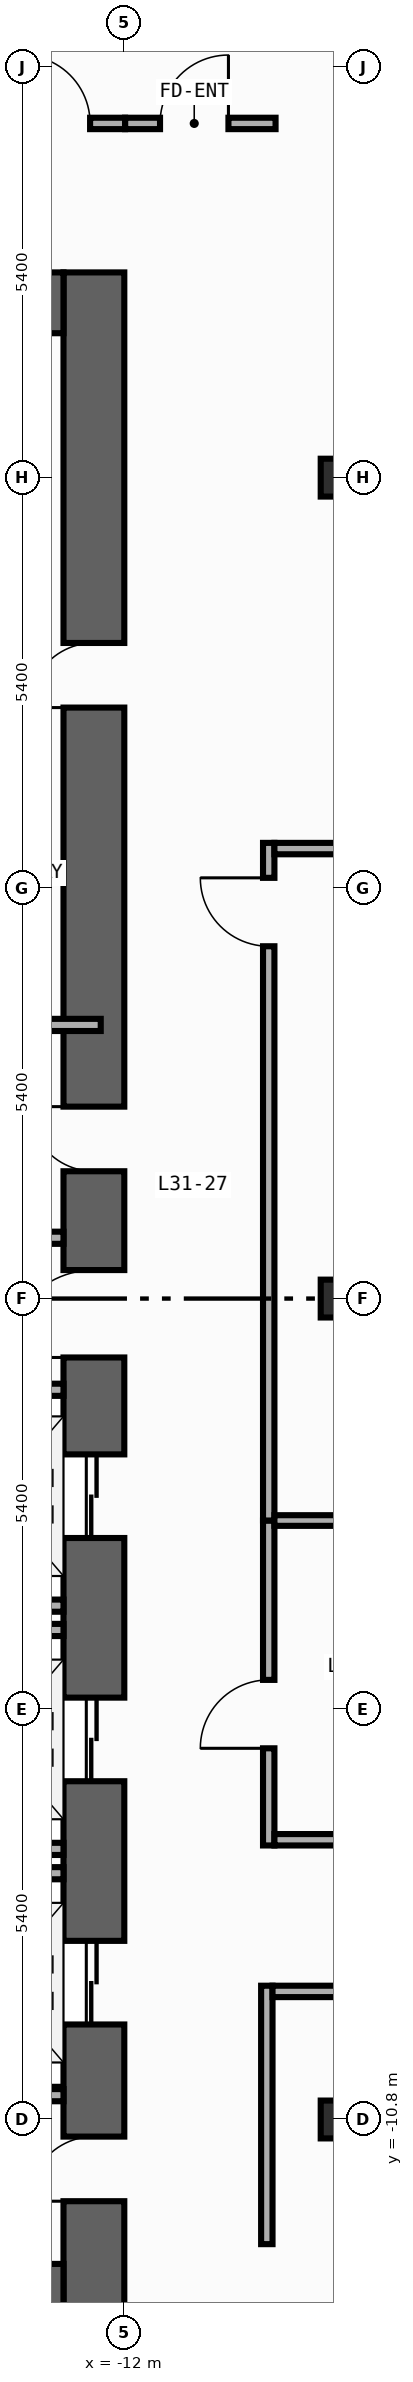
"""IFC4 building model, lengths in metres.
Left out: names, types, materials, properties, quantities, classifications, styles, units other than length and angle.
Written with IfcOpenShell. Run it as: python <this file> out.ifc"""

import sys

from ifc_helpers import new_model, si_unit, direction, frame, frame_2d, origin, origin_2d, place, context, subcontext, project, spatial, rectangle, i_section, extrude, element, fill, save


model = new_model("IFC4")
c1 = context("Model", 3, precision=1e-05, world=origin(), true_north=direction((0.0, 1.0)))
c2 = subcontext(c1, "Body", "Model", "MODEL_VIEW")
j1 = project(units=[si_unit("LENGTHUNIT", "METRE"), si_unit("PLANEANGLEUNIT", "RADIAN")], contexts=[c1])
p1 = place(None, origin())
s1 = spatial("IfcSite", under=j1, at=p1, CompositionType="ELEMENT")
p2 = place(p1, origin())
s2 = spatial("IfcBuilding", under=s1, at=p2, CompositionType="ELEMENT")
p3 = place(p2, frame((0.0, 0.0, 135.2)))
s3 = spatial("IfcBuildingStorey", under=s2, at=p3, CompositionType="ELEMENT", Elevation=135.2)
p4 = place(p3, frame((-12.4, -13.5, 0.0), z_axis=(0.0, 0.0, 1.0), x_axis=(0.0, 1.0, 0.0)))
e1 = element("IfcWall", 1, at=p4, inside=s3, PredefinedType="SHEAR", context=c2, shape_type="SweptSolid", body=[
    extrude(rectangle(XDim=27.0, YDim=0.8, at=frame_2d((13.5, 0.0))), origin(), (0.0, 0.0, 1.0), 3.94),
])
p5 = place(p4, frame((10.35, 0.0, 0.0)))
e2 = element("IfcOpeningElement", 2, at=p5, cuts=e1, PredefinedType="OPENING", context=c2, shape_type="SweptSolid", body=[
    extrude(rectangle(XDim=1.1, YDim=2.2, at=frame_2d((0.55, 1.1))), frame((0.0, 0.41, 0.0), z_axis=(0.0, -1.0, 0.0), x_axis=(1.0, 0.0, 0.0)), (0.0, 0.0, 1.0), 0.82),
])
p6 = place(p4, frame((7.15, 0.0, 0.0)))
e3 = element("IfcOpeningElement", 3, at=p6, cuts=e1, PredefinedType="OPENING", context=c2, shape_type="SweptSolid", body=[
    extrude(rectangle(XDim=1.1, YDim=2.2, at=frame_2d((0.55, 1.1))), frame((0.0, 0.41, 0.0), z_axis=(0.0, -1.0, 0.0), x_axis=(1.0, 0.0, 0.0)), (0.0, 0.0, 1.0), 0.82),
])
p7 = place(p4, frame((3.95, 0.0, 0.0)))
e4 = element("IfcOpeningElement", 4, at=p7, cuts=e1, PredefinedType="OPENING", context=c2, shape_type="SweptSolid", body=[
    extrude(rectangle(XDim=1.1, YDim=2.2, at=frame_2d((0.55, 1.1))), frame((0.0, 0.41, 0.0), z_axis=(0.0, -1.0, 0.0), x_axis=(1.0, 0.0, 0.0)), (0.0, 0.0, 1.0), 0.82),
])
p8 = place(p4, frame((15.175, 0.0, 0.0)))
e5 = element("IfcOpeningElement", 5, at=p8, cuts=e1, PredefinedType="OPENING", context=c2, shape_type="SweptSolid", body=[
    extrude(rectangle(XDim=0.85, YDim=2.1, at=frame_2d((0.425, 1.05))), frame((0.0, 0.41, 0.0), z_axis=(0.0, -1.0, 0.0), x_axis=(1.0, 0.0, 0.0)), (0.0, 0.0, 1.0), 0.82),
])
p9 = place(p4, frame((21.275, 0.0, 0.0)))
e6 = element("IfcOpeningElement", 6, at=p9, cuts=e1, PredefinedType="OPENING", context=c2, shape_type="SweptSolid", body=[
    extrude(rectangle(XDim=0.85, YDim=2.1, at=frame_2d((0.425, 1.05))), frame((0.0, 0.41, 0.0), z_axis=(0.0, -1.0, 0.0), x_axis=(1.0, 0.0, 0.0)), (0.0, 0.0, 1.0), 0.82),
])
p10 = place(p4, frame((12.725, 0.0, 0.0)))
e7 = element("IfcOpeningElement", 7, at=p10, cuts=e1, PredefinedType="OPENING", context=c2, shape_type="SweptSolid", body=[
    extrude(rectangle(XDim=1.15, YDim=2.2, at=frame_2d((0.575, 1.1))), frame((0.0, 0.41, 0.0), z_axis=(0.0, -1.0, 0.0), x_axis=(1.0, 0.0, 0.0)), (0.0, 0.0, 1.0), 0.82),
])
p11 = place(p4, frame((1.625, 0.0, 0.0)))
e8 = element("IfcOpeningElement", 8, at=p11, cuts=e1, PredefinedType="OPENING", context=c2, shape_type="SweptSolid", body=[
    extrude(rectangle(XDim=0.85, YDim=2.1, at=frame_2d((0.425, 1.05))), frame((0.0, 0.41, 0.0), z_axis=(0.0, -1.0, 0.0), x_axis=(1.0, 0.0, 0.0)), (0.0, 0.0, 1.0), 0.82),
])
for number, where, z_axis, x_axis in (
    (9, (-19.6, -13.1, 0.0), (0.0, 0.0, 1.0), (1.0, 0.0, 0.0)),
    (10, (-19.6, 13.1, 0.0), (0.0, 0.0, 1.0), (1.0, 0.0, 0.0)),
):
    element("IfcWall", number, at=place(p3, frame(where, z_axis=z_axis, x_axis=x_axis)), inside=s3, PredefinedType="SHEAR", context=c2, shape_type="SweptSolid", body=[
        extrude(rectangle(XDim=6.8, YDim=0.8, at=frame_2d((3.4, 0.0))), origin(), (0.0, 0.0, 1.0), 3.94),
    ])
for number, where, z_axis, x_axis in (
    (11, (-9.2, -10.8, 0.0), (0.0, 0.0, 1.0), (1.0, 0.0, 0.0)),
    (12, (-9.2, 0.0, 0.0), (0.0, 0.0, 1.0), (1.0, 0.0, 0.0)),
    (13, (-9.2, 10.8, 0.0), (0.0, 0.0, 1.0), (1.0, 0.0, 0.0)),
):
    element("IfcColumn", number, at=place(p3, frame(where, z_axis=z_axis, x_axis=x_axis)), inside=s3, PredefinedType="COLUMN", context=c2, shape_type="SweptSolid", body=[
        extrude(i_section(OverallWidth=0.432, OverallDepth=0.498, WebThickness=0.045, FlangeThickness=0.07, FilletRadius=0.022, at=origin_2d()), origin(), (0.0, 0.0, 1.0), 4.2),
    ])
for number, where, z_axis, x_axis in (
    (14, (-14.99, -4.04, 0.0), (0.0, 0.0, 1.0), (1.0, 0.0, 0.0)),
    (15, (-14.99, -7.24, 0.0), (0.0, 0.0, 1.0), (1.0, 0.0, 0.0)),
    (16, (-14.99, -4.36, 0.0), (0.0, 0.0, 1.0), (1.0, 0.0, 0.0)),
    (17, (-14.99, -7.56, 0.0), (0.0, 0.0, 1.0), (1.0, 0.0, 0.0)),
):
    element("IfcWall", number, at=place(p3, frame(where, z_axis=z_axis, x_axis=x_axis)), inside=s3, PredefinedType="STANDARD", context=c2, shape_type="SweptSolid", body=[
        extrude(rectangle(XDim=2.19, YDim=0.16, at=frame_2d((1.095, 0.0))), origin(), (0.0, 0.0, 1.0), 3.94),
    ])
for number, where, z_axis, x_axis in (
    (18, (-15.4, 0.8, 0.0), (0.0, 0.0, 1.0), (1.0, 0.0, 0.0)),
    (19, (-15.4, -1.2, 0.0), (0.0, 0.0, 1.0), (1.0, 0.0, 0.0)),
    (20, (-15.4, -10.48, 0.0), (0.0, 0.0, 1.0), (1.0, 0.0, 0.0)),
):
    element("IfcWall", number, at=place(p3, frame(where, z_axis=z_axis, x_axis=x_axis)), inside=s3, PredefinedType="STANDARD", context=c2, shape_type="SweptSolid", body=[
        extrude(rectangle(XDim=2.6, YDim=0.16, at=frame_2d((1.3, 0.0))), origin(), (0.0, 0.0, 1.0), 3.94),
    ])
p12 = place(p3, frame((-15.375, 3.6, 0.0), z_axis=(0.0, 0.0, 1.0), x_axis=(1.0, 0.0, 0.0)))
e21 = element("IfcWall", 21, at=p12, inside=s3, PredefinedType="PARTITIONING", context=c2, shape_type="SweptSolid", body=[
    extrude(rectangle(XDim=3.065, YDim=0.16, at=frame_2d((1.532, 0.0))), origin(), (0.0, 0.0, 1.0), 3.94),
])
p13 = place(p3, frame((-11.99, 15.46, 0.0), z_axis=(0.0, 0.0, 1.0), x_axis=(1.0, 0.0, 0.0)))
e22 = element("IfcWall", 22, at=p13, inside=s3, PredefinedType="PARTITIONING", context=c2, shape_type="SweptSolid", body=[
    extrude(rectangle(XDim=1.98, YDim=0.15, at=frame_2d((0.99, 0.0))), origin(), (0.0, 0.0, 1.0), 3.94),
])
p14 = place(p13, frame((0.46, 0.0, 0.0)))
e23 = element("IfcOpeningElement", 23, at=p14, cuts=e22, PredefinedType="OPENING", context=c2, shape_type="SweptSolid", body=[
    extrude(rectangle(XDim=0.9, YDim=2.15, at=frame_2d((0.45, 1.075))), frame((0.0, 0.085, 0.0), z_axis=(0.0, -1.0, 0.0), x_axis=(1.0, 0.0, 0.0)), (0.0, 0.0, 1.0), 0.17),
])
p15 = place(p3, frame((-10.1, -7.195, 0.0), z_axis=(0.0, 0.0, 1.0), x_axis=(0.0, 1.0, 0.0)))
e24 = element("IfcWall", 24, at=p15, inside=s3, PredefinedType="PARTITIONING", context=c2, shape_type="SweptSolid", body=[
    extrude(rectangle(XDim=4.275, YDim=0.15, at=frame_2d((2.138, 0.0))), origin(), (0.0, 0.0, 1.0), 3.94),
])
p16 = place(p15, frame((1.278, 0.0, 0.0)))
e25 = element("IfcOpeningElement", 25, at=p16, cuts=e24, PredefinedType="OPENING", context=c2, shape_type="SweptSolid", body=[
    extrude(rectangle(XDim=0.9, YDim=2.15, at=frame_2d((0.45, 1.075))), frame((0.0, 0.085, 0.0), z_axis=(0.0, -1.0, 0.0), x_axis=(1.0, 0.0, 0.0)), (0.0, 0.0, 1.0), 0.17),
])
p17 = place(p3, frame((-10.1, -2.92, 0.0), z_axis=(0.0, 0.0, 1.0), x_axis=(0.0, 1.0, 0.0)))
e26 = element("IfcWall", 26, at=p17, inside=s3, PredefinedType="PARTITIONING", context=c2, shape_type="SweptSolid", body=[
    extrude(rectangle(XDim=8.915, YDim=0.15, at=frame_2d((4.458, 0.0))), origin(), (0.0, 0.0, 1.0), 3.94),
])
p18 = place(p17, frame((7.555, 0.0, 0.0)))
e27 = element("IfcOpeningElement", 27, at=p18, cuts=e26, PredefinedType="OPENING", context=c2, shape_type="SweptSolid", body=[
    extrude(rectangle(XDim=0.9, YDim=2.15, at=frame_2d((0.45, 1.075))), frame((0.0, 0.085, 0.0), z_axis=(0.0, -1.0, 0.0), x_axis=(1.0, 0.0, 0.0)), (0.0, 0.0, 1.0), 0.17),
])
p19 = place(p3, frame((-10.125, -12.44, 0.0), z_axis=(0.0, 0.0, 1.0), x_axis=(0.0, 1.0, 0.0)))
e28 = element("IfcWall", 28, at=p19, inside=s3, PredefinedType="PARTITIONING", context=c2, shape_type="SweptSolid", body=[
    extrude(rectangle(XDim=3.4, YDim=0.15, at=frame_2d((1.7, 0.0))), origin(), (0.0, 0.0, 1.0), 3.94),
])
p20 = place(p3, frame((-10.025, 5.92, 0.0), z_axis=(0.0, 0.0, 1.0), x_axis=(1.0, 0.0, 0.0)))
e29 = element("IfcWall", 29, at=p20, inside=s3, PredefinedType="PARTITIONING", context=c2, shape_type="SweptSolid", body=[
    extrude(rectangle(XDim=8.82, YDim=0.15, at=frame_2d((4.41, 0.0))), origin(), (0.0, 0.0, 1.0), 3.94),
])
p21 = place(p20, frame((7.46, 0.0, 0.0)))
e30 = element("IfcOpeningElement", 30, at=p21, cuts=e29, PredefinedType="OPENING", context=c2, shape_type="SweptSolid", body=[
    extrude(rectangle(XDim=0.9, YDim=2.15, at=frame_2d((0.45, 1.075))), frame((0.0, 0.085, 0.0), z_axis=(0.0, -1.0, 0.0), x_axis=(1.0, 0.0, 0.0)), (0.0, 0.0, 1.0), 0.17),
])
p22 = place(p3, frame((-10.025, -7.12, 0.0), z_axis=(0.0, 0.0, 1.0), x_axis=(1.0, 0.0, 0.0)))
e31 = element("IfcWall", 31, at=p22, inside=s3, PredefinedType="PARTITIONING", context=c2, shape_type="SweptSolid", body=[
    extrude(rectangle(XDim=4.465, YDim=0.15, at=frame_2d((2.232, 0.0))), origin(), (0.0, 0.0, 1.0), 3.94),
])
p23 = place(p22, frame((3.105, 0.0, 0.0)))
e32 = element("IfcOpeningElement", 32, at=p23, cuts=e31, PredefinedType="OPENING", context=c2, shape_type="SweptSolid", body=[
    extrude(rectangle(XDim=0.9, YDim=2.15, at=frame_2d((0.45, 1.075))), frame((0.0, 0.085, 0.0), z_axis=(0.0, -1.0, 0.0), x_axis=(1.0, 0.0, 0.0)), (0.0, 0.0, 1.0), 0.17),
])
p24 = place(p3, frame((-10.05, -9.115, 0.0), z_axis=(0.0, 0.0, 1.0), x_axis=(1.0, 0.0, 0.0)))
e33 = element("IfcWall", 33, at=p24, inside=s3, PredefinedType="PARTITIONING", context=c2, shape_type="SweptSolid", body=[
    extrude(rectangle(XDim=8.265, YDim=0.15, at=frame_2d((4.133, 0.0))), origin(), (0.0, 0.0, 1.0), 3.94),
])
p25 = place(p24, frame((6.905, 0.0, 0.0)))
e34 = element("IfcOpeningElement", 34, at=p25, cuts=e33, PredefinedType="OPENING", context=c2, shape_type="SweptSolid", body=[
    extrude(rectangle(XDim=0.9, YDim=2.15, at=frame_2d((0.45, 1.075))), frame((0.0, 0.085, 0.0), z_axis=(0.0, -1.0, 0.0), x_axis=(1.0, 0.0, 0.0)), (0.0, 0.0, 1.0), 0.17),
])
p26 = place(p3, frame((-15.232, 15.46, 0.0), z_axis=(0.0, 0.0, 1.0), x_axis=(1.0, 0.0, 0.0)))
e35 = element("IfcWall", 35, at=p26, inside=s3, PredefinedType="PARTITIONING", context=c2, shape_type="SweptSolid", body=[
    extrude(rectangle(XDim=3.242, YDim=0.15, at=frame_2d((1.621, 0.0))), origin(), (0.0, 0.0, 1.0), 3.94),
])
p27 = place(p26, frame((1.882, 0.0, 0.0)))
e36 = element("IfcOpeningElement", 36, at=p27, cuts=e35, PredefinedType="OPENING", context=c2, shape_type="SweptSolid", body=[
    extrude(rectangle(XDim=0.9, YDim=2.15, at=frame_2d((0.45, 1.075))), frame((0.0, 0.085, 0.0), z_axis=(0.0, -1.0, 0.0), x_axis=(1.0, 0.0, 0.0)), (0.0, 0.0, 1.0), 0.17),
])
p28 = place(p3, frame((-10.025, -2.92, 0.0), z_axis=(0.0, 0.0, 1.0), x_axis=(1.0, 0.0, 0.0)))
e37 = element("IfcWall", 37, at=p28, inside=s3, PredefinedType="PARTITIONING", context=c2, shape_type="SweptSolid", body=[
    extrude(rectangle(XDim=4.465, YDim=0.14, at=frame_2d((2.232, 0.0))), origin(), (0.0, 0.0, 1.0), 3.94),
])
p29 = place(p5, origin())
e38 = element("IfcDoor", 38, at=p29, inside=s3, OperationType="DOUBLE_DOOR_SLIDING", PredefinedType="DOOR", context=c2, shape_type="SweptSolid", body=[
    extrude(rectangle(XDim=1.1, YDim=2.2, at=frame_2d((0.55, 1.1))), frame((0.0, 0.025, 0.0), z_axis=(0.0, -1.0, 0.0), x_axis=(1.0, 0.0, 0.0)), (0.0, 0.0, 1.0), 0.05),
])
fill(e2, e38)
p30 = place(p6, origin())
e39 = element("IfcDoor", 39, at=p30, inside=s3, OperationType="DOUBLE_DOOR_SLIDING", PredefinedType="DOOR", context=c2, shape_type="SweptSolid", body=[
    extrude(rectangle(XDim=1.1, YDim=2.2, at=frame_2d((0.55, 1.1))), frame((0.0, 0.025, 0.0), z_axis=(0.0, -1.0, 0.0), x_axis=(1.0, 0.0, 0.0)), (0.0, 0.0, 1.0), 0.05),
])
fill(e3, e39)
p31 = place(p7, origin())
e40 = element("IfcDoor", 40, at=p31, inside=s3, OperationType="DOUBLE_DOOR_SLIDING", PredefinedType="DOOR", context=c2, shape_type="SweptSolid", body=[
    extrude(rectangle(XDim=1.1, YDim=2.2, at=frame_2d((0.55, 1.1))), frame((0.0, 0.025, 0.0), z_axis=(0.0, -1.0, 0.0), x_axis=(1.0, 0.0, 0.0)), (0.0, 0.0, 1.0), 0.05),
])
fill(e4, e40)
p32 = place(p8, origin())
e41 = element("IfcDoor", 41, at=p32, inside=s3, OperationType="SINGLE_SWING_RIGHT", PredefinedType="DOOR", context=c2, shape_type="SweptSolid", body=[
    extrude(rectangle(XDim=0.85, YDim=2.1, at=frame_2d((0.425, 1.05))), frame((0.0, 0.025, 0.0), z_axis=(0.0, -1.0, 0.0), x_axis=(1.0, 0.0, 0.0)), (0.0, 0.0, 1.0), 0.05),
])
fill(e5, e41)
p33 = place(p9, origin())
e42 = element("IfcDoor", 42, at=p33, inside=s3, OperationType="SINGLE_SWING_LEFT", PredefinedType="DOOR", context=c2, shape_type="SweptSolid", body=[
    extrude(rectangle(XDim=0.85, YDim=2.1, at=frame_2d((0.425, 1.05))), frame((0.0, 0.025, 0.0), z_axis=(0.0, -1.0, 0.0), x_axis=(1.0, 0.0, 0.0)), (0.0, 0.0, 1.0), 0.05),
])
fill(e6, e42)
p34 = place(p10, origin())
e43 = element("IfcDoor", 43, at=p34, inside=s3, OperationType="SINGLE_SWING_LEFT", PredefinedType="DOOR", context=c2, shape_type="SweptSolid", body=[
    extrude(rectangle(XDim=1.15, YDim=2.2, at=frame_2d((0.575, 1.1))), frame((0.0, 0.025, 0.0), z_axis=(0.0, -1.0, 0.0), x_axis=(1.0, 0.0, 0.0)), (0.0, 0.0, 1.0), 0.05),
])
fill(e7, e43)
p35 = place(p11, origin())
e44 = element("IfcDoor", 44, at=p35, inside=s3, OperationType="SINGLE_SWING_LEFT", PredefinedType="DOOR", context=c2, shape_type="SweptSolid", body=[
    extrude(rectangle(XDim=0.85, YDim=2.1, at=frame_2d((0.425, 1.05))), frame((0.0, 0.025, 0.0), z_axis=(0.0, -1.0, 0.0), x_axis=(1.0, 0.0, 0.0)), (0.0, 0.0, 1.0), 0.05),
])
fill(e8, e44)
p36 = place(p14, origin())
e45 = element("IfcDoor", 45, at=p36, inside=s3, OperationType="SINGLE_SWING_RIGHT", PredefinedType="DOOR", context=c2, shape_type="SweptSolid", body=[
    extrude(rectangle(XDim=0.9, YDim=2.15, at=frame_2d((0.45, 1.075))), frame((0.0, 0.025, 0.0), z_axis=(0.0, -1.0, 0.0), x_axis=(1.0, 0.0, 0.0)), (0.0, 0.0, 1.0), 0.05),
])
fill(e23, e45)
p37 = place(p16, origin())
e46 = element("IfcDoor", 46, at=p37, inside=s3, OperationType="SINGLE_SWING_LEFT", PredefinedType="DOOR", context=c2, shape_type="SweptSolid", body=[
    extrude(rectangle(XDim=0.9, YDim=2.15, at=frame_2d((0.45, 1.075))), frame((0.0, 0.025, 0.0), z_axis=(0.0, -1.0, 0.0), x_axis=(1.0, 0.0, 0.0)), (0.0, 0.0, 1.0), 0.05),
])
fill(e25, e46)
p38 = place(p18, origin())
e47 = element("IfcDoor", 47, at=p38, inside=s3, OperationType="SINGLE_SWING_RIGHT", PredefinedType="DOOR", context=c2, shape_type="SweptSolid", body=[
    extrude(rectangle(XDim=0.9, YDim=2.15, at=frame_2d((0.45, 1.075))), frame((0.0, 0.025, 0.0), z_axis=(0.0, -1.0, 0.0), x_axis=(1.0, 0.0, 0.0)), (0.0, 0.0, 1.0), 0.05),
])
fill(e27, e47)
p39 = place(p27, origin())
e48 = element("IfcDoor", 48, at=p39, inside=s3, OperationType="SINGLE_SWING_LEFT", PredefinedType="DOOR", context=c2, shape_type="SweptSolid", body=[
    extrude(rectangle(XDim=0.9, YDim=2.15, at=frame_2d((0.45, 1.075))), frame((0.0, 0.025, 0.0), z_axis=(0.0, -1.0, 0.0), x_axis=(1.0, 0.0, 0.0)), (0.0, 0.0, 1.0), 0.05),
])
fill(e36, e48)
save(model, sys.argv[1])
